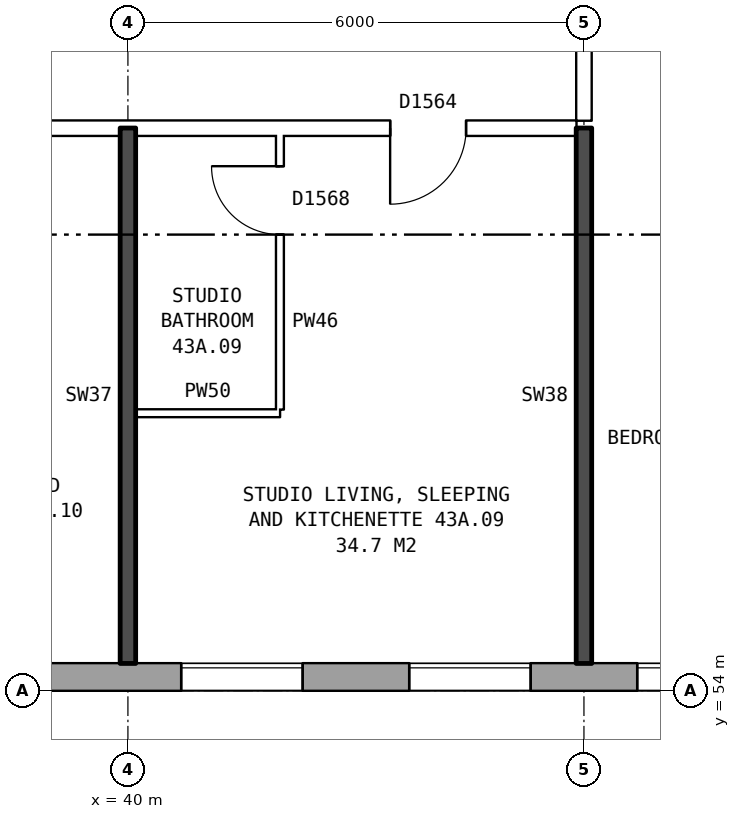
"""IFC4 building model, lengths in metres.
Left out: names, types, materials, properties, quantities, classifications, styles, units other than length and angle.
Written with IfcOpenShell. Run it as: python <this file> out.ifc"""

import sys

from ifc_helpers import new_model, si_unit, direction, frame, frame_2d, origin, place, context, subcontext, project, spatial, rectangle, extrude, element, fill, save


model = new_model("IFC4")
c1 = context("Model", 3, precision=1e-05, world=origin(), true_north=direction((0.0, 1.0)))
c2 = subcontext(c1, "Body", "Model", "MODEL_VIEW")
j1 = project(units=[si_unit("LENGTHUNIT", "METRE"), si_unit("PLANEANGLEUNIT", "RADIAN")], contexts=[c1])
p1 = place(None, origin())
s1 = spatial("IfcSite", under=j1, at=p1, CompositionType="ELEMENT")
p2 = place(p1, origin())
s2 = spatial("IfcBuilding", under=s1, at=p2, CompositionType="ELEMENT")
p3 = place(p2, frame((0.0, 0.0, 154.7)))
s3 = spatial("IfcBuildingStorey", under=s2, at=p3, CompositionType="ELEMENT", Elevation=154.7)
p4 = place(p3, frame((31.575, 54.18, 0.0), z_axis=(0.0, 0.0, 1.0), x_axis=(1.0, 0.0, 0.0)))
e1 = element("IfcWall", 1, at=p4, inside=s3, PredefinedType="STANDARD", context=c2, shape_type="SweptSolid", body=[
    extrude(rectangle(XDim=41.351, YDim=0.36, at=frame_2d((20.675, 0.0))), origin(), (0.0, 0.0, 1.0), 2.85),
])
p5 = place(p4, frame((3.125, 0.0, 0.8)))
e2 = element("IfcOpeningElement", 2, at=p5, cuts=e1, PredefinedType="OPENING", context=c2, shape_type="SweptSolid", body=[
    extrude(rectangle(XDim=1.6, YDim=1.8, at=frame_2d((0.8, 0.9))), frame((0.0, 0.19, 0.0), z_axis=(0.0, -1.0, 0.0), x_axis=(1.0, 0.0, 0.0)), (0.0, 0.0, 1.0), 0.38),
])
p6 = place(p4, frame((5.025, 0.0, 1.0)))
e3 = element("IfcOpeningElement", 3, at=p6, cuts=e1, PredefinedType="OPENING", context=c2, shape_type="SweptSolid", body=[
    extrude(rectangle(XDim=1.0, YDim=1.5, at=frame_2d((0.5, 0.75))), frame((0.0, 0.19, 0.0), z_axis=(0.0, -1.0, 0.0), x_axis=(1.0, 0.0, 0.0)), (0.0, 0.0, 1.0), 0.38),
])
p7 = place(p4, frame((9.125, 0.0, 0.8)))
e4 = element("IfcOpeningElement", 4, at=p7, cuts=e1, PredefinedType="OPENING", context=c2, shape_type="SweptSolid", body=[
    extrude(rectangle(XDim=1.6, YDim=1.8, at=frame_2d((0.8, 0.9))), frame((0.0, 0.19, 0.0), z_axis=(0.0, -1.0, 0.0), x_axis=(1.0, 0.0, 0.0)), (0.0, 0.0, 1.0), 0.38),
])
p8 = place(p4, frame((12.125, 0.0, 0.8)))
e5 = element("IfcOpeningElement", 5, at=p8, cuts=e1, PredefinedType="OPENING", context=c2, shape_type="SweptSolid", body=[
    extrude(rectangle(XDim=1.6, YDim=1.8, at=frame_2d((0.8, 0.9))), frame((0.0, 0.19, 0.0), z_axis=(0.0, -1.0, 0.0), x_axis=(1.0, 0.0, 0.0)), (0.0, 0.0, 1.0), 0.38),
])
p9 = place(p4, frame((15.125, 0.0, 0.8)))
e6 = element("IfcOpeningElement", 6, at=p9, cuts=e1, PredefinedType="OPENING", context=c2, shape_type="SweptSolid", body=[
    extrude(rectangle(XDim=1.6, YDim=1.8, at=frame_2d((0.8, 0.9))), frame((0.0, 0.19, 0.0), z_axis=(0.0, -1.0, 0.0), x_axis=(1.0, 0.0, 0.0)), (0.0, 0.0, 1.0), 0.38),
])
p10 = place(p4, frame((18.125, 0.0, 0.8)))
e7 = element("IfcOpeningElement", 7, at=p10, cuts=e1, PredefinedType="OPENING", context=c2, shape_type="SweptSolid", body=[
    extrude(rectangle(XDim=1.6, YDim=1.8, at=frame_2d((0.8, 0.9))), frame((0.0, 0.19, 0.0), z_axis=(0.0, -1.0, 0.0), x_axis=(1.0, 0.0, 0.0)), (0.0, 0.0, 1.0), 0.38),
])
p11 = place(p4, frame((21.125, 0.0, 0.8)))
e8 = element("IfcOpeningElement", 8, at=p11, cuts=e1, PredefinedType="OPENING", context=c2, shape_type="SweptSolid", body=[
    extrude(rectangle(XDim=1.6, YDim=1.8, at=frame_2d((0.8, 0.9))), frame((0.0, 0.19, 0.0), z_axis=(0.0, -1.0, 0.0), x_axis=(1.0, 0.0, 0.0)), (0.0, 0.0, 1.0), 0.38),
])
p12 = place(p4, frame((24.125, 0.0, 0.8)))
e9 = element("IfcOpeningElement", 9, at=p12, cuts=e1, PredefinedType="OPENING", context=c2, shape_type="SweptSolid", body=[
    extrude(rectangle(XDim=1.6, YDim=1.8, at=frame_2d((0.8, 0.9))), frame((0.0, 0.19, 0.0), z_axis=(0.0, -1.0, 0.0), x_axis=(1.0, 0.0, 0.0)), (0.0, 0.0, 1.0), 0.38),
])
p13 = place(p4, frame((27.125, 0.0, 0.8)))
e10 = element("IfcOpeningElement", 10, at=p13, cuts=e1, PredefinedType="OPENING", context=c2, shape_type="SweptSolid", body=[
    extrude(rectangle(XDim=1.6, YDim=1.8, at=frame_2d((0.8, 0.9))), frame((0.0, 0.19, 0.0), z_axis=(0.0, -1.0, 0.0), x_axis=(1.0, 0.0, 0.0)), (0.0, 0.0, 1.0), 0.38),
])
p14 = place(p4, frame((30.125, 0.0, 0.8)))
e11 = element("IfcOpeningElement", 11, at=p14, cuts=e1, PredefinedType="OPENING", context=c2, shape_type="SweptSolid", body=[
    extrude(rectangle(XDim=1.6, YDim=1.8, at=frame_2d((0.8, 0.9))), frame((0.0, 0.19, 0.0), z_axis=(0.0, -1.0, 0.0), x_axis=(1.0, 0.0, 0.0)), (0.0, 0.0, 1.0), 0.38),
])
p15 = place(p4, frame((34.425, 0.0, 1.7)))
e12 = element("IfcOpeningElement", 12, at=p15, cuts=e1, PredefinedType="OPENING", context=c2, shape_type="SweptSolid", body=[
    extrude(rectangle(XDim=1.4, YDim=0.9, at=frame_2d((0.7, 0.45))), frame((0.0, 0.19, 0.0), z_axis=(0.0, -1.0, 0.0), x_axis=(1.0, 0.0, 0.0)), (0.0, 0.0, 1.0), 0.38),
])
p16 = place(p4, frame((36.125, 0.0, 0.8)))
e13 = element("IfcOpeningElement", 13, at=p16, cuts=e1, PredefinedType="OPENING", context=c2, shape_type="SweptSolid", body=[
    extrude(rectangle(XDim=1.6, YDim=1.8, at=frame_2d((0.8, 0.9))), frame((0.0, 0.19, 0.0), z_axis=(0.0, -1.0, 0.0), x_axis=(1.0, 0.0, 0.0)), (0.0, 0.0, 1.0), 0.38),
])
p17 = place(p4, frame((39.125, 0.0, 0.8)))
e14 = element("IfcOpeningElement", 14, at=p17, cuts=e1, PredefinedType="OPENING", context=c2, shape_type="SweptSolid", body=[
    extrude(rectangle(XDim=1.6, YDim=1.8, at=frame_2d((0.8, 0.9))), frame((0.0, 0.19, 0.0), z_axis=(0.0, -1.0, 0.0), x_axis=(1.0, 0.0, 0.0)), (0.0, 0.0, 1.0), 0.38),
])
p18 = place(p4, frame((6.325, 0.0, 1.7)))
e15 = element("IfcOpeningElement", 15, at=p18, cuts=e1, PredefinedType="OPENING", context=c2, shape_type="SweptSolid", body=[
    extrude(rectangle(XDim=0.6, YDim=0.9, at=frame_2d((0.3, 0.45))), frame((0.0, 0.19, 0.0), z_axis=(0.0, -1.0, 0.0), x_axis=(1.0, 0.0, 0.0)), (0.0, 0.0, 1.0), 0.38),
])
p19 = place(p3, frame((40.1, 57.65, 0.0), z_axis=(0.0, 0.0, 1.0), x_axis=(1.0, 0.0, 0.0)))
e16 = element("IfcWall", 16, at=p19, inside=s3, PredefinedType="PARTITIONING", context=c2, shape_type="SweptSolid", body=[
    extrude(rectangle(XDim=1.9, YDim=0.1, at=frame_2d((0.95, 0.0))), origin(), (0.0, 0.0, 1.0), 2.85),
])
p20 = place(p3, frame((28.86, 61.4, 0.0), z_axis=(0.0, 0.0, 1.0), x_axis=(1.0, 0.0, 0.0)))
e17 = element("IfcWall", 17, at=p20, inside=s3, PredefinedType="PARTITIONING", context=c2, shape_type="SweptSolid", body=[
    extrude(rectangle(XDim=17.04, YDim=0.2, at=frame_2d((8.52, 0.0))), origin(), (0.0, 0.0, 1.0), 2.85),
])
p21 = place(p20, frame((14.59, 0.0, 0.0)))
e18 = element("IfcOpeningElement", 18, at=p21, cuts=e17, PredefinedType="OPENING", context=c2, shape_type="SweptSolid", body=[
    extrude(rectangle(XDim=1.0, YDim=2.1, at=frame_2d((0.5, 1.05))), frame((0.0, 0.11, 0.0), z_axis=(0.0, -1.0, 0.0), x_axis=(1.0, 0.0, 0.0)), (0.0, 0.0, 1.0), 0.22),
])
p22 = place(p20, frame((7.64, 0.0, 0.0)))
e19 = element("IfcOpeningElement", 19, at=p22, cuts=e17, PredefinedType="OPENING", context=c2, shape_type="SweptSolid", body=[
    extrude(rectangle(XDim=1.0, YDim=2.1, at=frame_2d((0.5, 1.05))), frame((0.0, 0.11, 0.0), z_axis=(0.0, -1.0, 0.0), x_axis=(1.0, 0.0, 0.0)), (0.0, 0.0, 1.0), 0.22),
])
p23 = place(p3, frame((40.0, 54.36, 0.0), z_axis=(0.0, 0.0, 1.0), x_axis=(0.0, 1.0, 0.0)))
e20 = element("IfcWall", 20, at=p23, inside=s3, PredefinedType="SOLIDWALL", context=c2, shape_type="SweptSolid", body=[
    extrude(rectangle(XDim=7.04, YDim=0.2, at=frame_2d((3.52, 0.0))), origin(), (0.0, 0.0, 1.0), 2.85),
])
p24 = place(p3, frame((42.0, 57.7, 0.0), z_axis=(0.0, 0.0, 1.0), x_axis=(0.0, 1.0, 0.0)))
e21 = element("IfcWall", 21, at=p24, inside=s3, PredefinedType="PARTITIONING", context=c2, shape_type="SweptSolid", body=[
    extrude(rectangle(XDim=3.6, YDim=0.1, at=frame_2d((1.8, 0.0))), origin(), (0.0, 0.0, 1.0), 2.85),
])
p25 = place(p24, frame((2.3, 0.0, 0.0)))
e22 = element("IfcOpeningElement", 22, at=p25, cuts=e21, PredefinedType="OPENING", context=c2, shape_type="SweptSolid", body=[
    extrude(rectangle(XDim=0.9, YDim=2.1, at=frame_2d((0.45, 1.05))), frame((0.0, 0.06, 0.0), z_axis=(0.0, -1.0, 0.0), x_axis=(1.0, 0.0, 0.0)), (0.0, 0.0, 1.0), 0.12),
])
p26 = place(p3, frame((46.0, 54.36, 0.0), z_axis=(0.0, 0.0, 1.0), x_axis=(0.0, 1.0, 0.0)))
e23 = element("IfcWall", 23, at=p26, inside=s3, PredefinedType="SOLIDWALL", context=c2, shape_type="SweptSolid", body=[
    extrude(rectangle(XDim=7.04, YDim=0.2, at=frame_2d((3.52, 0.0))), origin(), (0.0, 0.0, 1.0), 2.85),
])
p27 = place(p3, frame((46.0, 61.5, 0.0), z_axis=(0.0, 0.0, 1.0), x_axis=(0.0, 1.0, 0.0)))
e24 = element("IfcWall", 24, at=p27, inside=s3, PredefinedType="PARTITIONING", context=c2, shape_type="SweptSolid", body=[
    extrude(rectangle(XDim=2.2, YDim=0.2, at=frame_2d((1.1, 0.0))), origin(), (0.0, 0.0, 1.0), 2.85),
])
p28 = place(p7, origin())
e25 = element("IfcWindow", 25, at=p28, inside=s3, PartitioningType="SINGLE_PANEL", PredefinedType="WINDOW", context=c2, shape_type="SweptSolid", body=[
    extrude(rectangle(XDim=1.6, YDim=1.8, at=frame_2d((0.8, 0.9))), frame((0.0, 0.15, 0.0), z_axis=(0.0, -1.0, 0.0), x_axis=(1.0, 0.0, 0.0)), (0.0, 0.0, 1.0), 0.06),
])
fill(e4, e25)
p29 = place(p8, origin())
e26 = element("IfcWindow", 26, at=p29, inside=s3, PartitioningType="SINGLE_PANEL", PredefinedType="WINDOW", context=c2, shape_type="SweptSolid", body=[
    extrude(rectangle(XDim=1.6, YDim=1.8, at=frame_2d((0.8, 0.9))), frame((0.0, 0.15, 0.0), z_axis=(0.0, -1.0, 0.0), x_axis=(1.0, 0.0, 0.0)), (0.0, 0.0, 1.0), 0.06),
])
fill(e5, e26)
p30 = place(p9, origin())
e27 = element("IfcWindow", 27, at=p30, inside=s3, PartitioningType="SINGLE_PANEL", PredefinedType="WINDOW", context=c2, shape_type="SweptSolid", body=[
    extrude(rectangle(XDim=1.6, YDim=1.8, at=frame_2d((0.8, 0.9))), frame((0.0, 0.15, 0.0), z_axis=(0.0, -1.0, 0.0), x_axis=(1.0, 0.0, 0.0)), (0.0, 0.0, 1.0), 0.06),
])
fill(e6, e27)
p31 = place(p21, frame((1.0, 0.0, 0.0), z_axis=(0.0, 0.0, 1.0), x_axis=(-1.0, 0.0, 0.0)))
e28 = element("IfcDoor", 28, at=p31, inside=s3, OperationType="SINGLE_SWING_RIGHT", PredefinedType="DOOR", context=c2, shape_type="SweptSolid", body=[
    extrude(rectangle(XDim=1.0, YDim=2.1, at=frame_2d((0.5, 1.05))), frame((0.0, 0.025, 0.0), z_axis=(0.0, -1.0, 0.0), x_axis=(1.0, 0.0, 0.0)), (0.0, 0.0, 1.0), 0.05),
])
fill(e18, e28)
p32 = place(p25, origin())
e29 = element("IfcDoor", 29, at=p32, inside=s3, OperationType="SINGLE_SWING_RIGHT", PredefinedType="DOOR", context=c2, shape_type="SweptSolid", body=[
    extrude(rectangle(XDim=0.9, YDim=2.1, at=frame_2d((0.45, 1.05))), frame((0.0, 0.025, 0.0), z_axis=(0.0, -1.0, 0.0), x_axis=(1.0, 0.0, 0.0)), (0.0, 0.0, 1.0), 0.05),
])
fill(e22, e29)
save(model, sys.argv[1])
